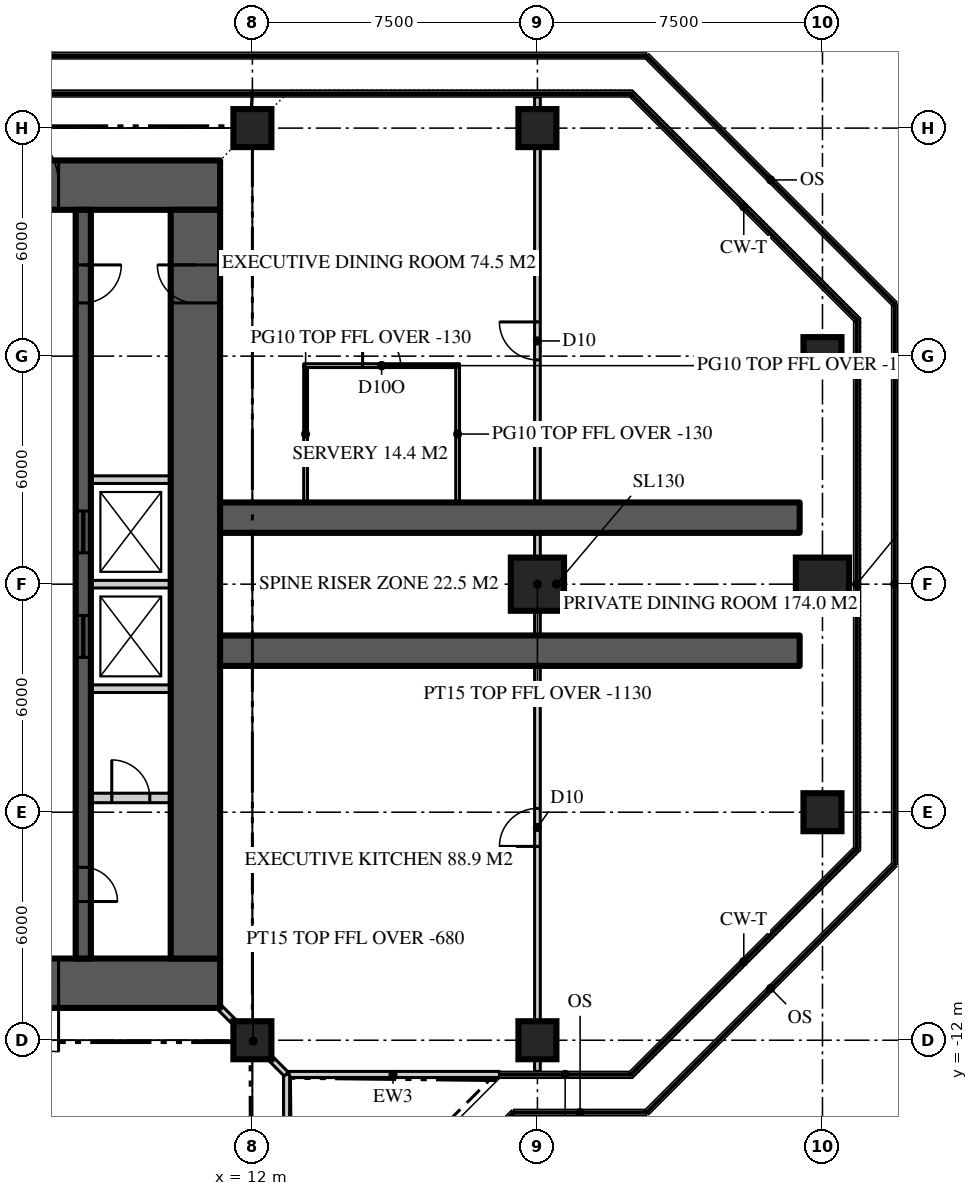
"""IFC4 building model, lengths in metres.
Left out: names, types, materials, properties, quantities, classifications, styles, units other than length and angle.
Written with IfcOpenShell. Run it as: python <this file> out.ifc"""

import sys

from ifc_helpers import new_model, si_unit, direction, frame, frame_2d, origin, origin_2d, place, context, subcontext, project, spatial, rectangle, extrude, element, fill, save


model = new_model("IFC4")
c1 = context("Model", 3, precision=1e-05, world=origin(), true_north=direction((0.0, 1.0)))
c2 = subcontext(c1, "Body", "Model", "MODEL_VIEW")
j1 = project(units=[si_unit("LENGTHUNIT", "METRE"), si_unit("PLANEANGLEUNIT", "RADIAN")], contexts=[c1])
p1 = place(None, origin())
s1 = spatial("IfcSite", under=j1, at=p1, CompositionType="ELEMENT")
p2 = place(p1, origin())
s2 = spatial("IfcBuilding", under=s1, at=p2, CompositionType="ELEMENT")
p3 = place(p2, frame((0.0, 0.0, 298.5)))
s3 = spatial("IfcBuildingStorey", under=s2, at=p3, CompositionType="ELEMENT", Elevation=298.5)
p4 = place(p3, frame((-11.15, 10.5, 0.0), z_axis=(0.0, 0.0, 1.0), x_axis=(1.0, 0.0, 0.0)))
e1 = element("IfcWall", 1, at=p4, inside=s3, PredefinedType="SHEAR", context=c2, shape_type="SweptSolid", body=[
    extrude(rectangle(XDim=22.3, YDim=1.3, at=frame_2d((11.15, 0.0))), origin(), (0.0, 0.0, 1.0), 3.9),
])
p5 = place(p4, frame((4.25, 0.0, 0.0)))
e2 = element("IfcOpeningElement", 2, at=p5, cuts=e1, PredefinedType="OPENING", context=c2, shape_type="SweptSolid", body=[
    extrude(rectangle(XDim=1.8, YDim=2.2, at=frame_2d((0.9, 1.1))), frame((0.0, 0.66, 0.0), z_axis=(0.0, -1.0, 0.0), x_axis=(1.0, 0.0, 0.0)), (0.0, 0.0, 1.0), 1.32),
])
p6 = place(p4, frame((16.25, 0.0, 0.0)))
e3 = element("IfcOpeningElement", 3, at=p6, cuts=e1, PredefinedType="OPENING", context=c2, shape_type="SweptSolid", body=[
    extrude(rectangle(XDim=1.8, YDim=2.2, at=frame_2d((0.9, 1.1))), frame((0.0, 0.66, 0.0), z_axis=(0.0, -1.0, 0.0), x_axis=(1.0, 0.0, 0.0)), (0.0, 0.0, 1.0), 1.32),
])
p7 = place(p3, frame((11.15, -10.5, 0.0), z_axis=(0.0, 0.0, 1.0), x_axis=(-1.0, 0.0, 0.0)))
e4 = element("IfcWall", 4, at=p7, inside=s3, PredefinedType="SHEAR", context=c2, shape_type="SweptSolid", body=[
    extrude(rectangle(XDim=22.3, YDim=1.3, at=frame_2d((11.15, 0.0))), origin(), (0.0, 0.0, 1.0), 3.9),
])
p8 = place(p7, frame((16.25, 0.0, 0.0)))
e5 = element("IfcOpeningElement", 5, at=p8, cuts=e4, PredefinedType="OPENING", context=c2, shape_type="SweptSolid", body=[
    extrude(rectangle(XDim=1.8, YDim=2.2, at=frame_2d((0.9, 1.1))), frame((0.0, 0.66, 0.0), z_axis=(0.0, -1.0, 0.0), x_axis=(1.0, 0.0, 0.0)), (0.0, 0.0, 1.0), 1.32),
])
p9 = place(p7, frame((4.25, 0.0, 0.0)))
e6 = element("IfcOpeningElement", 6, at=p9, cuts=e4, PredefinedType="OPENING", context=c2, shape_type="SweptSolid", body=[
    extrude(rectangle(XDim=1.8, YDim=2.2, at=frame_2d((0.9, 1.1))), frame((0.0, 0.66, 0.0), z_axis=(0.0, -1.0, 0.0), x_axis=(1.0, 0.0, 0.0)), (0.0, 0.0, 1.0), 1.32),
])
p10 = place(p3, frame((10.5, -9.85, 0.0), z_axis=(0.0, 0.0, 1.0), x_axis=(0.0, 1.0, 0.0)))
e7 = element("IfcWall", 7, at=p10, inside=s3, PredefinedType="SHEAR", context=c2, shape_type="SweptSolid", body=[
    extrude(rectangle(XDim=19.7, YDim=1.3, at=frame_2d((9.85, 0.0))), origin(), (0.0, 0.0, 1.0), 3.9),
])
p11 = place(p10, frame((17.25, 0.0, 0.0)))
e8 = element("IfcOpeningElement", 8, at=p11, cuts=e7, PredefinedType="OPENING", context=c2, shape_type="SweptSolid", body=[
    extrude(rectangle(XDim=1.0, YDim=2.2, at=frame_2d((0.5, 1.1))), frame((0.0, 0.66, 0.0), z_axis=(0.0, -1.0, 0.0), x_axis=(1.0, 0.0, 0.0)), (0.0, 0.0, 1.0), 1.32),
])
for number, where, z_axis, x_axis in (
    (9, (11.15, -1.75, 0.0), (0.0, 0.0, 1.0), (1.0, 0.0, 0.0)),
    (10, (11.15, 1.75, 0.0), (0.0, 0.0, 1.0), (1.0, 0.0, 0.0)),
):
    element("IfcWall", number, at=place(p3, frame(where, z_axis=z_axis, x_axis=x_axis)), inside=s3, PredefinedType="SHEAR", context=c2, shape_type="SweptSolid", body=[
        extrude(rectangle(XDim=15.25, YDim=0.8, at=frame_2d((7.625, 0.0))), origin(), (0.0, 0.0, 1.0), 3.9),
    ])
for number, where, z_axis, x_axis in (
    (11, (12.0, -12.0, 0.0), (0.0, 0.0, 1.0), (1.0, 0.0, 0.0)),
    (12, (19.5, -12.0, 0.0), (0.0, 0.0, 1.0), (1.0, 0.0, 0.0)),
    (13, (27.0, -6.0, 0.0), (0.0, 0.0, 1.0), (1.0, 0.0, 0.0)),
):
    element("IfcColumn", number, at=place(p3, frame(where, z_axis=z_axis, x_axis=x_axis)), inside=s3, PredefinedType="COLUMN", context=c2, shape_type="SweptSolid", body=[
        extrude(rectangle(XDim=1.0, YDim=1.0, at=origin_2d()), origin(), (0.0, 0.0, 1.0), 3.9),
    ])
for number, where, z_axis, x_axis in (
    (14, (19.5, 0.0, 0.0), (0.0, 0.0, 1.0), (1.0, 0.0, 0.0)),
    (15, (27.0, 0.0, 0.0), (0.0, 0.0, 1.0), (1.0, 0.0, 0.0)),
):
    element("IfcColumn", number, at=place(p3, frame(where, z_axis=z_axis, x_axis=x_axis)), inside=s3, PredefinedType="COLUMN", context=c2, shape_type="SweptSolid", body=[
        extrude(rectangle(XDim=1.4, YDim=1.4, at=origin_2d()), origin(), (0.0, 0.0, 1.0), 3.9),
    ])
for number, where, z_axis, x_axis in (
    (16, (27.0, 6.0, 0.0), (0.0, 0.0, 1.0), (1.0, 0.0, 0.0)),
    (17, (12.0, 12.0, 0.0), (0.0, 0.0, 1.0), (1.0, 0.0, 0.0)),
    (18, (19.5, 12.0, 0.0), (0.0, 0.0, 1.0), (1.0, 0.0, 0.0)),
):
    element("IfcColumn", number, at=place(p3, frame(where, z_axis=z_axis, x_axis=x_axis)), inside=s3, PredefinedType="COLUMN", context=c2, shape_type="SweptSolid", body=[
        extrude(rectangle(XDim=1.0, YDim=1.0, at=origin_2d()), origin(), (0.0, 0.0, 1.0), 3.9),
    ])
p12 = place(p3, frame((12.9, -12.9, 0.0), z_axis=(0.0, 0.0, 1.0), x_axis=(1.0, 0.0, 0.0)))
e19 = element("IfcWall", 19, at=p12, inside=s3, PredefinedType="SOLIDWALL", context=c2, shape_type="SweptSolid", body=[
    extrude(rectangle(XDim=5.6, YDim=0.16, at=frame_2d((2.8, 0.0))), origin(), (0.0, 0.0, 1.0), 3.77),
])
p13 = place(p3, frame((12.9, -18.5, 0.0), z_axis=(0.0, 0.0, 1.0), x_axis=(0.0, 1.0, 0.0)))
e20 = element("IfcWall", 20, at=p13, inside=s3, PredefinedType="SOLIDWALL", context=c2, shape_type="SweptSolid", body=[
    extrude(rectangle(XDim=5.6, YDim=0.16, at=frame_2d((2.8, 0.0))), origin(), (0.0, 0.0, 1.0), 3.77),
])
p14 = place(p13, frame((2.3, 0.0, 0.0)))
e21 = element("IfcOpeningElement", 21, at=p14, cuts=e20, PredefinedType="OPENING", context=c2, shape_type="SweptSolid", body=[
    extrude(rectangle(XDim=1.0, YDim=2.2, at=frame_2d((0.5, 1.1))), frame((0.0, 0.09, 0.0), z_axis=(0.0, -1.0, 0.0), x_axis=(1.0, 0.0, 0.0)), (0.0, 0.0, 1.0), 0.18),
])
p15 = place(p3, frame((7.55, 9.85, 0.0), z_axis=(0.0, 0.0, 1.0), x_axis=(0.0, -1.0, 0.0)))
e22 = element("IfcWall", 22, at=p15, inside=s3, PredefinedType="SHEAR", context=c2, shape_type="SweptSolid", body=[
    extrude(rectangle(XDim=19.7, YDim=0.4, at=frame_2d((9.85, 0.0))), origin(), (0.0, 0.0, 1.0), 3.9),
])
p16 = place(p15, frame((1.45, 0.0, 0.0)))
e23 = element("IfcOpeningElement", 23, at=p16, cuts=e22, PredefinedType="OPENING", context=c2, shape_type="SweptSolid", body=[
    extrude(rectangle(XDim=1.0, YDim=2.2, at=frame_2d((0.5, 1.1))), frame((0.0, 0.21, 0.0), z_axis=(0.0, -1.0, 0.0), x_axis=(1.0, 0.0, 0.0)), (0.0, 0.0, 1.0), 0.42),
])
p17 = place(p15, frame((17.3, 0.0, 0.0)))
e24 = element("IfcOpeningElement", 24, at=p17, cuts=e22, PredefinedType="OPENING", context=c2, shape_type="SweptSolid", body=[
    extrude(rectangle(XDim=0.9, YDim=2.1, at=frame_2d((0.45, 1.05))), frame((0.0, 0.21, 0.0), z_axis=(0.0, -1.0, 0.0), x_axis=(1.0, 0.0, 0.0)), (0.0, 0.0, 1.0), 0.42),
])
p18 = place(p15, frame((7.925, 0.0, 0.0)))
e25 = element("IfcOpeningElement", 25, at=p18, cuts=e22, PredefinedType="OPENING", context=c2, shape_type="SweptSolid", body=[
    extrude(rectangle(XDim=1.1, YDim=2.2, at=frame_2d((0.55, 1.1))), frame((0.0, 0.21, 0.0), z_axis=(0.0, -1.0, 0.0), x_axis=(1.0, 0.0, 0.0)), (0.0, 0.0, 1.0), 0.42),
])
p19 = place(p15, frame((10.675, 0.0, 0.0)))
e26 = element("IfcOpeningElement", 26, at=p19, cuts=e22, PredefinedType="OPENING", context=c2, shape_type="SweptSolid", body=[
    extrude(rectangle(XDim=1.1, YDim=2.2, at=frame_2d((0.55, 1.1))), frame((0.0, 0.21, 0.0), z_axis=(0.0, -1.0, 0.0), x_axis=(1.0, 0.0, 0.0)), (0.0, 0.0, 1.0), 0.42),
])
p20 = place(p3, frame((7.75, -5.625, 0.0), z_axis=(0.0, 0.0, 1.0), x_axis=(1.0, 0.0, 0.0)))
e27 = element("IfcWall", 27, at=p20, inside=s3, PredefinedType="SOLIDWALL", context=c2, shape_type="SweptSolid", body=[
    extrude(rectangle(XDim=2.1, YDim=0.25, at=frame_2d((1.05, 0.0))), origin(), (0.0, 0.0, 1.0), 3.7),
])
p21 = place(p20, frame((0.55, 0.0, 0.0)))
e28 = element("IfcOpeningElement", 28, at=p21, cuts=e27, PredefinedType="OPENING", context=c2, shape_type="SweptSolid", body=[
    extrude(rectangle(XDim=1.0, YDim=2.2, at=frame_2d((0.5, 1.1))), frame((0.0, 0.135, 0.0), z_axis=(0.0, -1.0, 0.0), x_axis=(1.0, 0.0, 0.0)), (0.0, 0.0, 1.0), 0.27),
])
for number, where, z_axis, x_axis in (
    (29, (7.75, -2.75, 0.0), (0.0, 0.0, 1.0), (1.0, 0.0, 0.0)),
    (30, (7.75, 0.0, 0.0), (0.0, 0.0, 1.0), (1.0, 0.0, 0.0)),
    (31, (7.75, 2.75, 0.0), (0.0, 0.0, 1.0), (1.0, 0.0, 0.0)),
):
    element("IfcWall", number, at=place(p3, frame(where, z_axis=z_axis, x_axis=x_axis)), inside=s3, PredefinedType="SOLIDWALL", context=c2, shape_type="SweptSolid", body=[
        extrude(rectangle(XDim=2.1, YDim=0.2, at=frame_2d((1.05, 0.0))), origin(), (0.0, 0.0, 1.0), 3.7),
    ])
p22 = place(p3, frame((19.5, -12.82, 0.0), z_axis=(0.0, 0.0, 1.0), x_axis=(0.0, 1.0, 0.0)))
e32 = element("IfcWall", 32, at=p22, inside=s3, PredefinedType="PARTITIONING", context=c2, shape_type="SweptSolid", body=[
    extrude(rectangle(XDim=25.64, YDim=0.15, at=frame_2d((12.82, 0.0))), origin(), (0.0, 0.0, 1.0), 2.77),
])
p23 = place(p22, frame((18.72, 0.0, 0.0)))
e33 = element("IfcOpeningElement", 33, at=p23, cuts=e32, PredefinedType="OPENING", context=c2, shape_type="SweptSolid", body=[
    extrude(rectangle(XDim=1.0, YDim=2.2, at=frame_2d((0.5, 1.1))), frame((0.0, 0.085, 0.0), z_axis=(0.0, -1.0, 0.0), x_axis=(1.0, 0.0, 0.0)), (0.0, 0.0, 1.0), 0.17),
])
p24 = place(p22, frame((5.92, 0.0, 0.0)))
e34 = element("IfcOpeningElement", 34, at=p24, cuts=e32, PredefinedType="OPENING", context=c2, shape_type="SweptSolid", body=[
    extrude(rectangle(XDim=1.0, YDim=2.2, at=frame_2d((0.5, 1.1))), frame((0.0, 0.085, 0.0), z_axis=(0.0, -1.0, 0.0), x_axis=(1.0, 0.0, 0.0)), (0.0, 0.0, 1.0), 0.17),
])
for number, where, z_axis, x_axis in (
    (35, (13.4, 2.15, 0.0), (0.0, 0.0, 1.0), (0.0, 1.0, 0.0)),
    (36, (17.4, 2.15, 0.0), (0.0, 0.0, 1.0), (0.0, 1.0, 0.0)),
):
    element("IfcWall", number, at=place(p3, frame(where, z_axis=z_axis, x_axis=x_axis)), inside=s3, PredefinedType="PARTITIONING", context=c2, shape_type="SweptSolid", body=[
        extrude(rectangle(XDim=3.6, YDim=0.1, at=frame_2d((1.8, 0.0))), origin(), (0.0, 0.0, 1.0), 3.77),
    ])
p25 = place(p3, frame((13.35, 5.75, 0.0), z_axis=(0.0, 0.0, 1.0), x_axis=(1.0, 0.0, 0.0)))
e37 = element("IfcWall", 37, at=p25, inside=s3, PredefinedType="PARTITIONING", context=c2, shape_type="SweptSolid", body=[
    extrude(rectangle(XDim=4.1, YDim=0.1, at=frame_2d((2.05, 0.0))), origin(), (0.0, 0.0, 1.0), 3.77),
])
p26 = place(p25, frame((1.55, 0.0, 0.0)))
e38 = element("IfcOpeningElement", 38, at=p26, cuts=e37, PredefinedType="OPENING", context=c2, shape_type="SweptSolid", body=[
    extrude(rectangle(XDim=1.0, YDim=2.2, at=frame_2d((0.5, 1.1))), frame((0.0, 0.06, 0.0), z_axis=(0.0, -1.0, 0.0), x_axis=(1.0, 0.0, 0.0)), (0.0, 0.0, 1.0), 0.12),
])
p27 = place(p3, frame((11.15, -11.15, 0.0), z_axis=(0.0, 0.0, 1.0), x_axis=(0.707106781187, -0.707106781187, 0.0)))
e39 = element("IfcWall", 39, at=p27, inside=s3, PredefinedType="PARTITIONING", context=c2, shape_type="SweptSolid", body=[
    extrude(rectangle(XDim=2.461, YDim=0.15, at=frame_2d((1.23, 0.0))), origin(), (0.0, 0.0, 1.0), 3.22),
])
p28 = place(p6, origin())
e40 = element("IfcDoor", 40, at=p28, inside=s3, OperationType="DOUBLE_DOOR_DOUBLE_SWING", PredefinedType="DOOR", context=c2, shape_type="SweptSolid", body=[
    extrude(rectangle(XDim=1.8, YDim=2.2, at=frame_2d((0.9, 1.1))), frame((0.0, 0.025, 0.0), z_axis=(0.0, -1.0, 0.0), x_axis=(1.0, 0.0, 0.0)), (0.0, 0.0, 1.0), 0.05),
])
fill(e3, e40)
p29 = place(p9, origin())
e41 = element("IfcDoor", 41, at=p29, inside=s3, OperationType="DOUBLE_DOOR_DOUBLE_SWING", PredefinedType="DOOR", context=c2, shape_type="SweptSolid", body=[
    extrude(rectangle(XDim=1.8, YDim=2.2, at=frame_2d((0.9, 1.1))), frame((0.0, 0.025, 0.0), z_axis=(0.0, -1.0, 0.0), x_axis=(1.0, 0.0, 0.0)), (0.0, 0.0, 1.0), 0.05),
])
fill(e6, e41)
p30 = place(p16, origin())
e42 = element("IfcDoor", 42, at=p30, inside=s3, OperationType="SINGLE_SWING_LEFT", PredefinedType="DOOR", context=c2, shape_type="SweptSolid", body=[
    extrude(rectangle(XDim=1.0, YDim=2.2, at=frame_2d((0.5, 1.1))), frame((0.0, 0.025, 0.0), z_axis=(0.0, -1.0, 0.0), x_axis=(1.0, 0.0, 0.0)), (0.0, 0.0, 1.0), 0.05),
])
fill(e23, e42)
p31 = place(p11, origin())
e43 = element("IfcDoor", 43, at=p31, inside=s3, OperationType="SINGLE_SWING_RIGHT", PredefinedType="DOOR", context=c2, shape_type="SweptSolid", body=[
    extrude(rectangle(XDim=1.0, YDim=2.2, at=frame_2d((0.5, 1.1))), frame((0.0, 0.025, 0.0), z_axis=(0.0, -1.0, 0.0), x_axis=(1.0, 0.0, 0.0)), (0.0, 0.0, 1.0), 0.05),
])
fill(e8, e43)
p32 = place(p17, origin())
e44 = element("IfcDoor", 44, at=p32, inside=s3, OperationType="SINGLE_SWING_RIGHT", PredefinedType="DOOR", context=c2, shape_type="SweptSolid", body=[
    extrude(rectangle(XDim=0.9, YDim=2.1, at=frame_2d((0.45, 1.05))), frame((0.0, 0.025, 0.0), z_axis=(0.0, -1.0, 0.0), x_axis=(1.0, 0.0, 0.0)), (0.0, 0.0, 1.0), 0.05),
])
fill(e24, e44)
p33 = place(p18, origin())
e45 = element("IfcDoor", 45, at=p33, inside=s3, OperationType="SLIDING_TO_LEFT", PredefinedType="DOOR", context=c2, shape_type="SweptSolid", body=[
    extrude(rectangle(XDim=1.1, YDim=2.2, at=frame_2d((0.55, 1.1))), frame((0.0, 0.025, 0.0), z_axis=(0.0, -1.0, 0.0), x_axis=(1.0, 0.0, 0.0)), (0.0, 0.0, 1.0), 0.05),
])
fill(e25, e45)
p34 = place(p19, origin())
e46 = element("IfcDoor", 46, at=p34, inside=s3, OperationType="SLIDING_TO_LEFT", PredefinedType="DOOR", context=c2, shape_type="SweptSolid", body=[
    extrude(rectangle(XDim=1.1, YDim=2.2, at=frame_2d((0.55, 1.1))), frame((0.0, 0.025, 0.0), z_axis=(0.0, -1.0, 0.0), x_axis=(1.0, 0.0, 0.0)), (0.0, 0.0, 1.0), 0.05),
])
fill(e26, e46)
p35 = place(p23, origin())
e47 = element("IfcDoor", 47, at=p35, inside=s3, OperationType="SINGLE_SWING_RIGHT", PredefinedType="DOOR", context=c2, shape_type="SweptSolid", body=[
    extrude(rectangle(XDim=1.0, YDim=2.2, at=frame_2d((0.5, 1.1))), frame((0.0, 0.025, 0.0), z_axis=(0.0, -1.0, 0.0), x_axis=(1.0, 0.0, 0.0)), (0.0, 0.0, 1.0), 0.05),
])
fill(e33, e47)
p36 = place(p24, origin())
e48 = element("IfcDoor", 48, at=p36, inside=s3, OperationType="SINGLE_SWING_LEFT", PredefinedType="DOOR", context=c2, shape_type="SweptSolid", body=[
    extrude(rectangle(XDim=1.0, YDim=2.2, at=frame_2d((0.5, 1.1))), frame((0.0, 0.025, 0.0), z_axis=(0.0, -1.0, 0.0), x_axis=(1.0, 0.0, 0.0)), (0.0, 0.0, 1.0), 0.05),
])
fill(e34, e48)
p37 = place(p26, origin())
e49 = element("IfcDoor", 49, at=p37, inside=s3, OperationType="SINGLE_SWING_LEFT", PredefinedType="DOOR", context=c2, shape_type="SweptSolid", body=[
    extrude(rectangle(XDim=1.0, YDim=2.2, at=frame_2d((0.5, 1.1))), frame((0.0, 0.025, 0.0), z_axis=(0.0, -1.0, 0.0), x_axis=(1.0, 0.0, 0.0)), (0.0, 0.0, 1.0), 0.05),
])
fill(e38, e49)
p38 = place(p21, origin())
e50 = element("IfcDoor", 50, at=p38, inside=s3, OperationType="SINGLE_SWING_LEFT", PredefinedType="DOOR", context=c2, shape_type="SweptSolid", body=[
    extrude(rectangle(XDim=1.0, YDim=2.2, at=frame_2d((0.5, 1.1))), frame((0.0, 0.025, 0.0), z_axis=(0.0, -1.0, 0.0), x_axis=(1.0, 0.0, 0.0)), (0.0, 0.0, 1.0), 0.05),
])
fill(e28, e50)
save(model, sys.argv[1])
